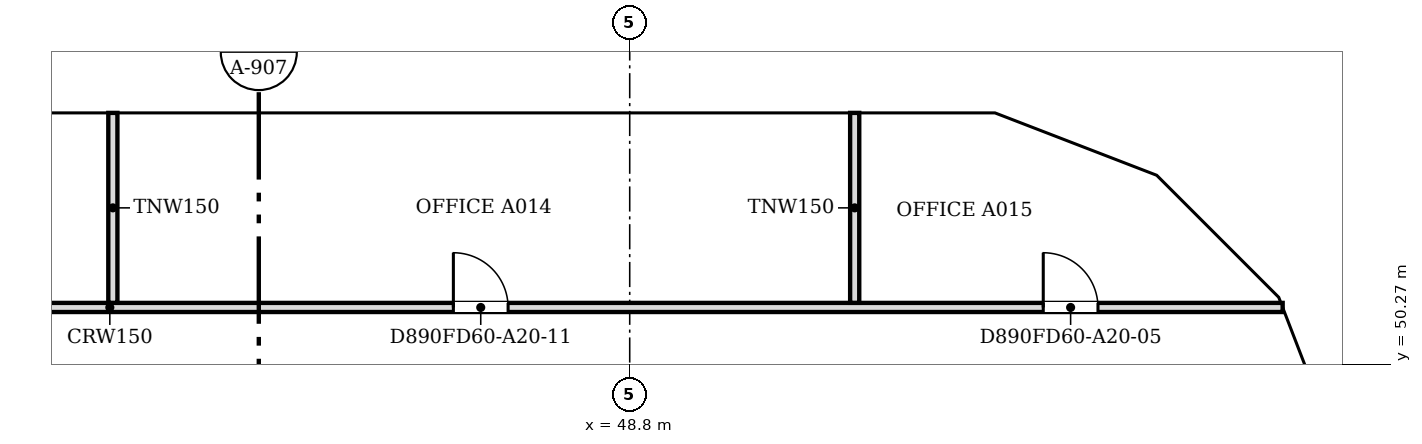
"""IFC4 building model, lengths in metres.
Left out: names, types, materials, properties, quantities, classifications, styles, units other than length and angle.
Written with IfcOpenShell. Run it as: python <this file> out.ifc"""

import sys

from ifc_helpers import new_model, si_unit, direction, frame, frame_2d, origin, place, context, subcontext, project, spatial, polyline, rectangle, outline, extrude, faceted_brep, source, transform, mapped, element, fill, save


model = new_model("IFC4")
c1 = context("Model", 3, precision=1e-05, world=origin(), true_north=direction((0.0, 1.0)))
c2 = subcontext(c1, "Body", "Model", "MODEL_VIEW")
j1 = project(units=[si_unit("LENGTHUNIT", "METRE"), si_unit("PLANEANGLEUNIT", "RADIAN")], contexts=[c1])
p1 = place(None, origin())
s1 = spatial("IfcSite", under=j1, at=p1, CompositionType="ELEMENT")
p2 = place(p1, origin())
s2 = spatial("IfcBuilding", under=s1, at=p2, CompositionType="ELEMENT")
p3 = place(p2, frame((0.0, 0.0, 228.3)))
s3 = spatial("IfcBuildingStorey", under=s2, at=p3, CompositionType="ELEMENT", Elevation=228.3)
m1 = source(origin(), c2, "Body", "Brep", [
    faceted_brep([(2.95, -0.25, 0.0), (3.003, -0.25, 0.068), (3.003, -0.25, 7.532), (2.95, -0.25, 7.6), (0.0, -0.25, 3.8), (0.047, 0.25, 3.86), (2.898, 0.25, 7.532), (2.898, 0.25, 0.068), (0.047, 0.25, 3.74), (2.95, 0.0, 0.0), (2.95, 0.0, 7.6), (0.0, 0.0, 3.8)], [[[0, 1, 2, 3, 4]], [[5, 6, 7, 8]], [[1, 0, 9]], [[10, 3, 2]], [[6, 5, 11, 4, 3, 10]], [[8, 7, 9, 0, 4, 11]], [[8, 11, 5]], [[1, 9, 7, 6, 10, 2]]]),
])
p4 = place(p3, frame((60.75, 48.753, -3.8), z_axis=(0.0, 0.0, 1.0), x_axis=(-0.35992665181, 0.932980602862, 0.0)))
e1 = element("IfcWall", 1, at=p4, inside=s3, PredefinedType="SOLIDWALL", context=c2, shape_type="MappedRepresentation", body=[
    mapped(m1, transform((0.0, 0.0, 0.0), scale=1.0)),
])
m2 = source(origin(), c2, "Body", "SweptSolid", [
    extrude(outline(polyline([(2.75, 6.935), (0.316, 3.8), (2.75, 0.665), (2.75, 6.935)])), frame((0.0, 0.26, 0.0), z_axis=(0.0, -1.0, 0.0), x_axis=(1.0, 0.0, 0.0)), (0.0, 0.0, 1.0), 0.52),
])
p5 = place(p4, origin())
e2 = element("IfcOpeningElement", 2, at=p5, cuts=e1, PredefinedType="OPENING", context=c2, shape_type="MappedRepresentation", body=[
    mapped(m2, transform((0.0, 0.0, 0.0), scale=1.0)),
])
m3 = source(origin(), c2, "Body", "Brep", [
    faceted_brep([(0.053, -0.25, 0.0), (2.997, -0.25, 3.8), (0.053, -0.25, 7.6), (0.0, -0.25, 7.532), (0.0, -0.25, 0.068), (0.106, 0.25, 7.532), (2.944, 0.25, 3.868), (2.944, 0.25, 3.732), (0.106, 0.25, 0.068), (2.997, 0.0, 3.8), (0.053, 0.0, 0.0), (0.053, 0.0, 7.6)], [[[0, 1, 2, 3, 4]], [[5, 6, 7, 8]], [[8, 7, 9, 1, 0, 10]], [[6, 5, 11, 2, 1, 9]], [[3, 2, 11]], [[10, 0, 4]], [[8, 10, 4, 3, 11, 5]], [[9, 7, 6]]]),
])
p6 = place(p3, frame((59.726, 51.469, -3.8), z_axis=(0.0, 0.0, 1.0), x_axis=(-0.707106781187, 0.707106781187, 0.0)))
e3 = element("IfcWall", 3, at=p6, inside=s3, PredefinedType="SOLIDWALL", context=c2, shape_type="MappedRepresentation", body=[
    mapped(m3, transform((0.0, 0.0, 0.0), scale=1.0)),
])
m4 = source(origin(), c2, "Body", "SweptSolid", [
    extrude(outline(polyline([(0.253, 0.666), (2.681, 3.8), (0.253, 6.934), (0.253, 0.666)])), frame((0.0, 0.26, 0.0), z_axis=(0.0, -1.0, 0.0), x_axis=(1.0, 0.0, 0.0)), (0.0, 0.0, 1.0), 0.52),
])
p7 = place(p6, origin())
e4 = element("IfcOpeningElement", 4, at=p7, cuts=e3, PredefinedType="OPENING", context=c2, shape_type="MappedRepresentation", body=[
    mapped(m4, transform((0.0, 0.0, 0.0), scale=1.0)),
])
m5 = source(origin(), c2, "Body", "Brep", [
    faceted_brep([(2.95, -0.25, 0.0), (2.997, -0.25, 0.059), (2.997, -0.25, 7.541), (2.95, -0.25, 7.6), (0.0, -0.25, 3.8), (0.053, 0.25, 3.868), (2.904, 0.25, 7.54), (2.904, 0.25, 0.06), (0.053, 0.25, 3.732), (2.95, 0.0, 0.0), (2.95, 0.0, 7.6), (0.0, 0.0, 3.8)], [[[0, 1, 2, 3, 4]], [[5, 6, 7, 8]], [[1, 0, 9]], [[10, 3, 2]], [[6, 5, 11, 4, 3, 10]], [[8, 7, 9, 0, 4, 11]], [[8, 11, 5]], [[1, 9, 7, 6, 10, 2]]]),
])
p8 = place(p3, frame((57.606, 53.588, -3.8), z_axis=(0.0, 0.0, 1.0), x_axis=(-0.932990326376, 0.359901446078, 0.0)))
e5 = element("IfcWall", 5, at=p8, inside=s3, PredefinedType="SOLIDWALL", context=c2, shape_type="MappedRepresentation", body=[
    mapped(m5, transform((0.0, 0.0, 0.0), scale=1.0)),
])
p9 = place(p8, origin())
e6 = element("IfcOpeningElement", 6, at=p9, cuts=e5, PredefinedType="OPENING", context=c2, shape_type="MappedRepresentation", body=[
    mapped(m2, transform((0.0, 0.0, 0.0), scale=1.0)),
])
m6 = source(origin(), c2, "Body", "Brep", [
    faceted_brep([(0.047, -0.25, 0.0), (3.05, -0.25, 3.8), (0.047, -0.25, 7.6), (0.0, -0.25, 7.54), (0.0, -0.25, 0.06), (0.093, 0.25, 7.541), (3.05, 0.25, 3.8), (0.093, 0.25, 0.059), (0.047, 0.0, 0.0), (0.047, 0.0, 7.6)], [[[0, 1, 2, 3, 4]], [[5, 6, 7]], [[7, 6, 1, 0, 8]], [[6, 5, 9, 2, 1]], [[3, 2, 9]], [[8, 0, 4]], [[7, 8, 4, 3, 9, 5]]]),
])
p10 = place(p3, frame((54.9, 54.65, -3.8), z_axis=(0.0, 0.0, 1.0), x_axis=(-1.0, 0.0, 0.0)))
e7 = element("IfcWall", 7, at=p10, inside=s3, PredefinedType="SOLIDWALL", context=c2, shape_type="MappedRepresentation", body=[
    mapped(m6, transform((0.0, 0.0, 0.0), scale=1.0)),
])
m7 = source(origin(), c2, "Body", "SweptSolid", [
    extrude(outline(polyline([(0.247, 0.656), (2.731, 3.8), (0.247, 6.944), (0.247, 0.656)])), frame((0.0, 0.26, 0.0), z_axis=(0.0, -1.0, 0.0), x_axis=(1.0, 0.0, 0.0)), (0.0, 0.0, 1.0), 0.52),
])
p11 = place(p10, origin())
e8 = element("IfcOpeningElement", 8, at=p11, cuts=e7, PredefinedType="OPENING", context=c2, shape_type="MappedRepresentation", body=[
    mapped(m7, transform((0.0, 0.0, 0.0), scale=1.0)),
])
m8 = source(origin(), c2, "Body", "SweptSolid", [
    extrude(outline(polyline([(3.05, 0.0), (6.1, 3.8), (3.05, 7.6), (0.0, 3.8), (3.05, 0.0)])), frame((0.0, 0.25, 0.0), z_axis=(0.0, -1.0, 0.0), x_axis=(1.0, 0.0, 0.0)), (0.0, 0.0, 1.0), 0.5),
])
p12 = place(p3, frame((51.85, 54.65, -3.8), z_axis=(0.0, 0.0, 1.0), x_axis=(-1.0, 0.0, 0.0)))
e9 = element("IfcWall", 9, at=p12, inside=s3, PredefinedType="SOLIDWALL", context=c2, shape_type="MappedRepresentation", body=[
    mapped(m8, transform((0.0, 0.0, 0.0), scale=1.0)),
])
m9 = source(origin(), c2, "Body", "SweptSolid", [
    extrude(outline(polyline([(3.05, 0.399), (5.78, 3.8), (3.05, 7.201), (0.321, 3.8), (3.05, 0.399)])), frame((0.0, 0.26, 0.0), z_axis=(0.0, -1.0, 0.0), x_axis=(1.0, 0.0, 0.0)), (0.0, 0.0, 1.0), 0.52),
])
p13 = place(p12, origin())
e10 = element("IfcOpeningElement", 10, at=p13, cuts=e9, PredefinedType="OPENING", context=c2, shape_type="MappedRepresentation", body=[
    mapped(m9, transform((0.0, 0.0, 0.0), scale=1.0)),
])
p14 = place(p3, frame((45.75, 54.65, -3.8), z_axis=(0.0, 0.0, 1.0), x_axis=(-1.0, 0.0, 0.0)))
e11 = element("IfcWall", 11, at=p14, inside=s3, PredefinedType="SOLIDWALL", context=c2, shape_type="MappedRepresentation", body=[
    mapped(m8, transform((0.0, 0.0, 0.0), scale=1.0)),
])
p15 = place(p14, origin())
e12 = element("IfcOpeningElement", 12, at=p15, cuts=e11, PredefinedType="OPENING", context=c2, shape_type="MappedRepresentation", body=[
    mapped(m9, transform((0.0, 0.0, 0.0), scale=1.0)),
])
m10 = source(origin(), c2, "Body", "Brep", [
    faceted_brep([(3.05, -0.25, 0.0), (6.1, -0.25, 3.8), (6.1, -0.25, 3.8), (3.05, -0.25, 7.6), (0.0, -0.25, 3.8), (0.0, 0.25, 3.8), (3.05, 0.25, 7.6), (6.1, 0.25, 3.8), (6.1, 0.25, 3.8), (3.05, 0.25, 0.0)], [[[0, 1, 2, 3, 4]], [[5, 6, 7, 8, 9]], [[9, 8, 1, 0]], [[7, 6, 3, 2]], [[6, 5, 4, 3]], [[5, 9, 0, 4]], [[1, 8, 7, 2]]]),
])
p16 = place(p3, frame((39.65, 54.65, -3.8), z_axis=(0.0, 0.0, 1.0), x_axis=(-1.0, 0.0, 0.0)))
e13 = element("IfcWall", 13, at=p16, inside=s3, PredefinedType="SOLIDWALL", context=c2, shape_type="MappedRepresentation", body=[
    mapped(m10, transform((0.0, 0.0, 0.0), scale=1.0)),
])
p17 = place(p16, origin())
e14 = element("IfcOpeningElement", 14, at=p17, cuts=e13, PredefinedType="OPENING", context=c2, shape_type="MappedRepresentation", body=[
    mapped(m9, transform((0.0, 0.0, 0.0), scale=1.0)),
])
m11 = source(origin(), c2, "Body", "Brep", [
    faceted_brep([(0.047, -0.25, 0.0), (2.997, -0.25, 3.8), (0.0, -0.25, 3.8), (0.0, -0.25, 0.059), (0.093, 0.25, 3.8), (2.944, 0.25, 3.8), (2.944, 0.25, 3.732), (0.093, 0.25, 0.06), (2.997, 0.0, 3.8), (0.047, 0.0, 0.0)], [[[0, 1, 2, 3]], [[4, 5, 6, 7]], [[7, 6, 8, 1, 0, 9]], [[5, 4, 2, 1, 8]], [[9, 0, 3]], [[7, 9, 3, 2, 4]], [[6, 5, 8]]]),
])
p18 = place(p3, frame((60.767, 48.71, 0.0), z_axis=(0.0, 0.0, 1.0), x_axis=(-0.359901446078, 0.932990326376, 0.0)))
e15 = element("IfcWall", 15, at=p18, inside=s3, PredefinedType="SOLIDWALL", context=c2, shape_type="MappedRepresentation", body=[
    mapped(m11, transform((0.0, 0.0, 0.0), scale=1.0)),
])
m12 = source(origin(), c2, "Body", "SweptSolid", [
    extrude(outline(polyline([(0.247, 0.665), (2.487, 3.55), (0.247, 3.55), (0.247, 0.665)])), frame((0.0, 0.26, 0.0), z_axis=(0.0, -1.0, 0.0), x_axis=(1.0, 0.0, 0.0)), (0.0, 0.0, 1.0), 0.52),
])
p19 = place(p18, origin())
e16 = element("IfcOpeningElement", 16, at=p19, cuts=e15, PredefinedType="OPENING", context=c2, shape_type="MappedRepresentation", body=[
    mapped(m12, transform((0.0, 0.0, 0.0), scale=1.0)),
])
m13 = source(origin(), c2, "Body", "Brep", [
    faceted_brep([(2.944, -0.25, 0.0), (2.997, -0.25, 0.068), (2.997, -0.25, 3.8), (0.0, -0.25, 3.8), (0.053, 0.25, 3.8), (2.891, 0.25, 3.8), (2.891, 0.25, 0.068), (0.053, 0.25, 3.732), (2.944, 0.0, 0.0), (0.0, 0.0, 3.8)], [[[0, 1, 2, 3]], [[4, 5, 6, 7]], [[1, 0, 8]], [[5, 4, 9, 3, 2]], [[7, 6, 8, 0, 3, 9]], [[7, 9, 4]], [[1, 8, 6, 5, 2]]]),
])
p20 = place(p3, frame((59.688, 51.506, 0.0), z_axis=(0.0, 0.0, 1.0), x_axis=(-0.707106781187, 0.707106781187, 0.0)))
e17 = element("IfcWall", 17, at=p20, inside=s3, PredefinedType="SOLIDWALL", context=c2, shape_type="MappedRepresentation", body=[
    mapped(m13, transform((0.0, 0.0, 0.0), scale=1.0)),
])
m14 = source(origin(), c2, "Body", "SweptSolid", [
    extrude(outline(polyline([(2.744, 3.55), (0.51, 3.55), (2.744, 0.666), (2.744, 3.55)])), frame((0.0, 0.26, 0.0), z_axis=(0.0, -1.0, 0.0), x_axis=(1.0, 0.0, 0.0)), (0.0, 0.0, 1.0), 0.52),
])
p21 = place(p20, origin())
e18 = element("IfcOpeningElement", 18, at=p21, cuts=e17, PredefinedType="OPENING", context=c2, shape_type="MappedRepresentation", body=[
    mapped(m14, transform((0.0, 0.0, 0.0), scale=1.0)),
])
m15 = source(origin(), c2, "Body", "Brep", [
    faceted_brep([(0.053, -0.25, 0.0), (3.003, -0.25, 3.8), (0.0, -0.25, 3.8), (0.0, -0.25, 0.068), (0.106, 0.25, 3.8), (2.957, 0.25, 3.8), (2.957, 0.25, 3.74), (0.106, 0.25, 0.068), (3.003, 0.0, 3.8), (0.053, 0.0, 0.0)], [[[0, 1, 2, 3]], [[4, 5, 6, 7]], [[7, 6, 8, 1, 0, 9]], [[5, 4, 2, 1, 8]], [[9, 0, 3]], [[7, 9, 3, 2, 4]], [[6, 5, 8]]]),
])
p22 = place(p3, frame((57.656, 53.569, 0.0), z_axis=(0.0, 0.0, 1.0), x_axis=(-0.933007896601, 0.359855894603, 0.0)))
e19 = element("IfcWall", 19, at=p22, inside=s3, PredefinedType="SOLIDWALL", context=c2, shape_type="MappedRepresentation", body=[
    mapped(m15, transform((0.0, 0.0, 0.0), scale=1.0)),
])
m16 = source(origin(), c2, "Body", "SweptSolid", [
    extrude(outline(polyline([(0.253, 0.665), (2.493, 3.55), (0.253, 3.55), (0.253, 0.665)])), frame((0.0, 0.26, 0.0), z_axis=(0.0, -1.0, 0.0), x_axis=(1.0, 0.0, 0.0)), (0.0, 0.0, 1.0), 0.52),
])
p23 = place(p22, origin())
e20 = element("IfcOpeningElement", 20, at=p23, cuts=e19, PredefinedType="OPENING", context=c2, shape_type="MappedRepresentation", body=[
    mapped(m16, transform((0.0, 0.0, 0.0), scale=1.0)),
])
m17 = source(origin(), c2, "Body", "Brep", [
    faceted_brep([(3.003, -0.25, 0.0), (6.053, -0.25, 3.8), (0.0, -0.25, 3.8), (0.047, 0.25, 3.8), (6.053, 0.25, 3.8), (3.003, 0.25, 0.0), (0.047, 0.25, 3.741), (0.0, 0.0, 3.8)], [[[0, 1, 2]], [[3, 4, 5, 6]], [[5, 4, 1, 0]], [[4, 3, 7, 2, 1]], [[6, 5, 0, 2, 7]], [[6, 7, 3]]]),
])
p24 = place(p3, frame((54.854, 54.65, 0.0), z_axis=(0.0, 0.0, 1.0), x_axis=(-1.0, 0.0, 0.0)))
e21 = element("IfcWall", 21, at=p24, inside=s3, PredefinedType="SOLIDWALL", context=c2, shape_type="MappedRepresentation", body=[
    mapped(m17, transform((0.0, 0.0, 0.0), scale=1.0)),
])
m18 = source(origin(), c2, "Body", "SweptSolid", [
    extrude(outline(polyline([(3.005, 0.401), (5.532, 3.55), (0.516, 3.55), (3.005, 0.401)])), frame((0.0, 0.26, 0.0), z_axis=(0.0, -1.0, 0.0), x_axis=(1.0, 0.0, 0.0)), (0.0, 0.0, 1.0), 0.52),
])
p25 = place(p24, origin())
e22 = element("IfcOpeningElement", 22, at=p25, cuts=e21, PredefinedType="OPENING", context=c2, shape_type="MappedRepresentation", body=[
    mapped(m18, transform((0.0, 0.0, 0.0), scale=1.0)),
])
m19 = source(origin(), c2, "Body", "SweptSolid", [
    extrude(outline(polyline([(3.05, 0.0), (6.1, 3.8), (0.0, 3.8), (3.05, 0.0)])), frame((0.0, 0.25, 0.0), z_axis=(0.0, -1.0, 0.0), x_axis=(1.0, 0.0, 0.0)), (0.0, 0.0, 1.0), 0.5),
])
p26 = place(p3, frame((48.8, 54.65, 0.0), z_axis=(0.0, 0.0, 1.0), x_axis=(-1.0, 0.0, 0.0)))
e23 = element("IfcWall", 23, at=p26, inside=s3, PredefinedType="SOLIDWALL", context=c2, shape_type="MappedRepresentation", body=[
    mapped(m19, transform((0.0, 0.0, 0.0), scale=1.0)),
])
m20 = source(origin(), c2, "Body", "SweptSolid", [
    extrude(outline(polyline([(3.05, 0.399), (5.579, 3.55), (0.521, 3.55), (3.05, 0.399)])), frame((0.0, 0.26, 0.0), z_axis=(0.0, -1.0, 0.0), x_axis=(1.0, 0.0, 0.0)), (0.0, 0.0, 1.0), 0.52),
])
p27 = place(p26, origin())
e24 = element("IfcOpeningElement", 24, at=p27, cuts=e23, PredefinedType="OPENING", context=c2, shape_type="MappedRepresentation", body=[
    mapped(m20, transform((0.0, 0.0, 0.0), scale=1.0)),
])
m21 = source(origin(), c2, "Body", "Brep", [
    faceted_brep([(3.05, -0.25, 0.0), (6.1, -0.25, 3.8), (6.1, -0.25, 3.8), (0.0, -0.25, 3.8), (0.0, 0.25, 3.8), (6.1, 0.25, 3.8), (6.1, 0.25, 3.8), (3.05, 0.25, 0.0)], [[[0, 1, 2, 3]], [[4, 5, 6, 7]], [[7, 6, 1, 0]], [[5, 4, 3, 2]], [[4, 7, 0, 3]], [[1, 6, 5, 2]]]),
])
p28 = place(p3, frame((42.7, 54.65, 0.0), z_axis=(0.0, 0.0, 1.0), x_axis=(-1.0, 0.0, 0.0)))
e25 = element("IfcWall", 25, at=p28, inside=s3, PredefinedType="SOLIDWALL", context=c2, shape_type="MappedRepresentation", body=[
    mapped(m21, transform((0.0, 0.0, 0.0), scale=1.0)),
])
p29 = place(p28, origin())
e26 = element("IfcOpeningElement", 26, at=p29, cuts=e25, PredefinedType="OPENING", context=c2, shape_type="MappedRepresentation", body=[
    mapped(m20, transform((0.0, 0.0, 0.0), scale=1.0)),
])
p30 = place(p3, frame((28.1, 51.2, 0.0), z_axis=(0.0, 0.0, 1.0), x_axis=(1.0, 0.0, 0.0)))
e27 = element("IfcWall", 27, at=p30, inside=s3, PredefinedType="PARTITIONING", context=c2, shape_type="SweptSolid", body=[
    extrude(rectangle(XDim=31.438, YDim=0.15, at=frame_2d((15.719, 0.0))), origin(), (0.0, 0.0, 1.0), 2.888),
])
m22 = source(origin(), c2, "Body", "SweptSolid", [
    extrude(rectangle(XDim=0.9, YDim=2.1, at=frame_2d((0.45, 1.05))), frame((0.0, 0.085, 0.0), z_axis=(0.0, -1.0, 0.0), x_axis=(1.0, 0.0, 0.0)), (0.0, 0.0, 1.0), 0.17),
])
p31 = place(p30, frame((27.501, 0.0, 0.0)))
e28 = element("IfcOpeningElement", 28, at=p31, cuts=e27, PredefinedType="OPENING", context=c2, shape_type="MappedRepresentation", body=[
    mapped(m22, transform((0.0, 0.0, 0.0), scale=1.0)),
])
p32 = place(p30, frame((5.6, 0.0, 0.0)))
e29 = element("IfcOpeningElement", 29, at=p32, cuts=e27, PredefinedType="OPENING", context=c2, shape_type="MappedRepresentation", body=[
    mapped(m22, transform((0.0, 0.0, 0.0), scale=1.0)),
])
p33 = place(p30, frame((17.8, 0.0, 0.0)))
e30 = element("IfcOpeningElement", 30, at=p33, cuts=e27, PredefinedType="OPENING", context=c2, shape_type="MappedRepresentation", body=[
    mapped(m22, transform((0.0, 0.0, 0.0), scale=1.0)),
])
for number, where, z_axis, x_axis in (
    (31, (40.3, 51.276, 0.0), (0.0, 0.0, 1.0), (0.0, 1.0, 0.0)),
    (32, (52.5, 51.276, 0.0), (0.0, 0.0, 1.0), (0.0, 1.0, 0.0)),
):
    element("IfcWall", number, at=place(p3, frame(where, z_axis=z_axis, x_axis=x_axis)), inside=s3, PredefinedType="PARTITIONING", context=c2, shape_type="SweptSolid", body=[
        extrude(rectangle(XDim=3.124, YDim=0.15, at=frame_2d((1.562, 0.0))), origin(), (0.0, 0.0, 1.0), 2.888),
    ])
m23 = source(origin(), c2, "Body", "SweptSolid", [
    extrude(rectangle(XDim=0.9, YDim=2.1, at=frame_2d((0.45, 1.05))), frame((0.0, 0.025, 0.0), z_axis=(0.0, -1.0, 0.0), x_axis=(1.0, 0.0, 0.0)), (0.0, 0.0, 1.0), 0.05),
])
p34 = place(p31, origin())
e33 = element("IfcDoor", 33, at=p34, inside=s3, OperationType="SINGLE_SWING_LEFT", PredefinedType="DOOR", context=c2, shape_type="MappedRepresentation", body=[
    mapped(m23, transform((0.0, 0.0, 0.0), scale=1.0)),
])
fill(e28, e33)
p35 = place(p33, origin())
e34 = element("IfcDoor", 34, at=p35, inside=s3, OperationType="SINGLE_SWING_LEFT", PredefinedType="DOOR", context=c2, shape_type="MappedRepresentation", body=[
    mapped(m23, transform((0.0, 0.0, 0.0), scale=1.0)),
])
fill(e30, e34)
save(model, sys.argv[1])
